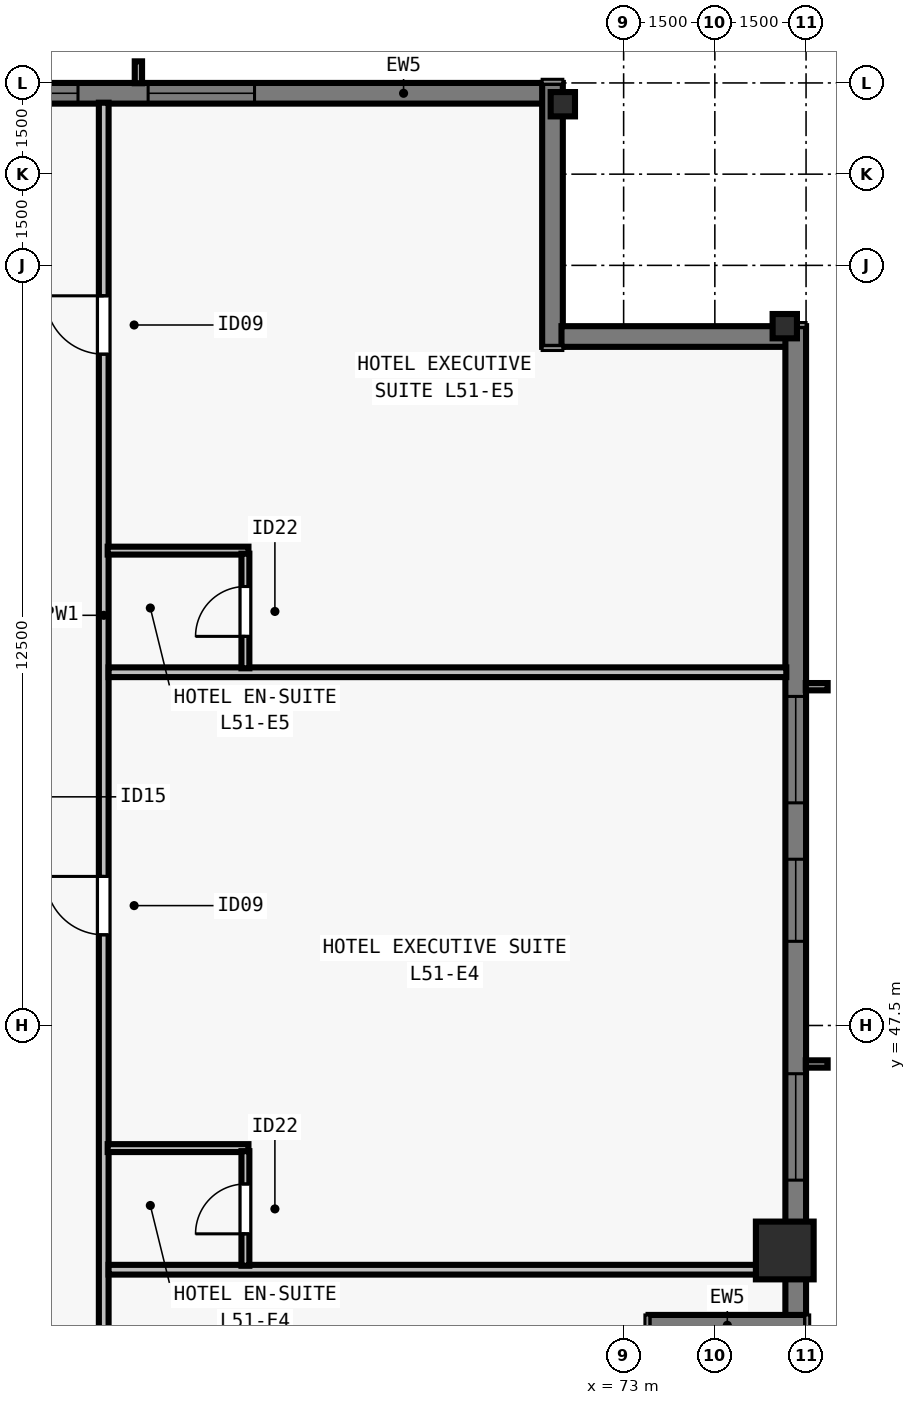
"""IFC4 building model, lengths in metres.
Left out: names, types, materials, properties, quantities, classifications, styles, units other than length and angle.
Written with IfcOpenShell. Run it as: python <this file> out.ifc"""

import sys

from ifc_helpers import new_model, si_unit, direction, frame, frame_2d, origin, origin_2d, place, context, subcontext, project, spatial, rectangle, i_section, extrude, element, fill, save


model = new_model("IFC4")
c1 = context("Model", 3, precision=1e-05, world=origin(), true_north=direction((0.0, 1.0)))
c2 = subcontext(c1, "Body", "Model", "MODEL_VIEW")
j1 = project(units=[si_unit("LENGTHUNIT", "METRE"), si_unit("PLANEANGLEUNIT", "RADIAN")], contexts=[c1])
p1 = place(None, origin())
s1 = spatial("IfcSite", under=j1, at=p1, CompositionType="ELEMENT")
p2 = place(p1, origin())
s2 = spatial("IfcBuilding", under=s1, at=p2, CompositionType="ELEMENT")
p3 = place(p2, frame((0.0, 0.0, 186.5)))
s3 = spatial("IfcBuildingStorey", under=s2, at=p3, CompositionType="ELEMENT", Elevation=186.5)
p4 = place(p3, frame((75.65, 43.8, 0.0), z_axis=(0.0, 0.0, 1.0), x_axis=(0.0, 1.0, 0.0)))
e1 = element("IfcColumn", 1, at=p4, inside=s3, PredefinedType="COLUMN", context=c2, shape_type="SweptSolid", body=[
    extrude(rectangle(XDim=0.95, YDim=0.95, at=origin_2d()), origin(), (0.0, 0.0, 1.0), 3.5),
])
for number, where, z_axis, x_axis in (
    (2, (75.65, 59.0, 0.0), (0.0, 0.0, 1.0), (0.0, 1.0, 0.0)),
    (3, (72.0, 62.65, 0.0), (0.0, 0.0, 1.0), (1.0, 0.0, 0.0)),
):
    element("IfcColumn", number, at=place(p3, frame(where, z_axis=z_axis, x_axis=x_axis)), inside=s3, PredefinedType="COLUMN", context=c2, shape_type="SweptSolid", body=[
        extrude(i_section(OverallWidth=0.4, OverallDepth=0.4, WebThickness=0.022, FlangeThickness=0.036, at=origin_2d()), origin(), (0.0, 0.0, 1.0), 3.5),
    ])
p5 = place(p3, frame((32.0, 62.83, 0.0), z_axis=(0.0, 0.0, 1.0), x_axis=(1.0, 0.0, 0.0)))
e4 = element("IfcWall", 4, at=p5, inside=s3, PredefinedType="SOLIDWALL", context=c2, shape_type="SweptSolid", body=[
    extrude(rectangle(XDim=39.682, YDim=0.34, at=frame_2d((19.841, 0.0))), origin(), (0.0, 0.0, 1.0), 3.28),
])
p6 = place(p5, frame((3.902, 0.0, 0.8)))
e5 = element("IfcOpeningElement", 5, at=p6, cuts=e4, PredefinedType="OPENING", context=c2, shape_type="SweptSolid", body=[
    extrude(rectangle(XDim=1.75, YDim=1.66, at=frame_2d((0.875, 0.83))), frame((0.0, 0.18, 0.0), z_axis=(0.0, -1.0, 0.0), x_axis=(1.0, 0.0, 0.0)), (0.0, 0.0, 1.0), 0.36),
])
p7 = place(p5, frame((8.505, 0.0, 0.8)))
e6 = element("IfcOpeningElement", 6, at=p7, cuts=e4, PredefinedType="OPENING", context=c2, shape_type="SweptSolid", body=[
    extrude(rectangle(XDim=1.35, YDim=1.66, at=frame_2d((0.675, 0.83))), frame((0.0, 0.18, 0.0), z_axis=(0.0, -1.0, 0.0), x_axis=(1.0, 0.0, 0.0)), (0.0, 0.0, 1.0), 0.36),
])
p8 = place(p5, frame((11.859, 0.0, 0.8)))
e7 = element("IfcOpeningElement", 7, at=p8, cuts=e4, PredefinedType="OPENING", context=c2, shape_type="SweptSolid", body=[
    extrude(rectangle(XDim=1.75, YDim=1.66, at=frame_2d((0.875, 0.83))), frame((0.0, 0.18, 0.0), z_axis=(0.0, -1.0, 0.0), x_axis=(1.0, 0.0, 0.0)), (0.0, 0.0, 1.0), 0.36),
])
p9 = place(p5, frame((16.062, 0.0, 0.8)))
e8 = element("IfcOpeningElement", 8, at=p9, cuts=e4, PredefinedType="OPENING", context=c2, shape_type="SweptSolid", body=[
    extrude(rectangle(XDim=1.35, YDim=1.66, at=frame_2d((0.675, 0.83))), frame((0.0, 0.18, 0.0), z_axis=(0.0, -1.0, 0.0), x_axis=(1.0, 0.0, 0.0)), (0.0, 0.0, 1.0), 0.36),
])
p10 = place(p5, frame((17.716, 0.0, 0.8)))
e9 = element("IfcOpeningElement", 9, at=p10, cuts=e4, PredefinedType="OPENING", context=c2, shape_type="SweptSolid", body=[
    extrude(rectangle(XDim=1.75, YDim=1.66, at=frame_2d((0.875, 0.83))), frame((0.0, 0.18, 0.0), z_axis=(0.0, -1.0, 0.0), x_axis=(1.0, 0.0, 0.0)), (0.0, 0.0, 1.0), 0.36),
])
p11 = place(p5, frame((22.719, 0.0, 0.8)))
e10 = element("IfcOpeningElement", 10, at=p11, cuts=e4, PredefinedType="OPENING", context=c2, shape_type="SweptSolid", body=[
    extrude(rectangle(XDim=1.35, YDim=1.66, at=frame_2d((0.675, 0.83))), frame((0.0, 0.18, 0.0), z_axis=(0.0, -1.0, 0.0), x_axis=(1.0, 0.0, 0.0)), (0.0, 0.0, 1.0), 0.36),
])
p12 = place(p5, frame((26.073, 0.0, 0.8)))
e11 = element("IfcOpeningElement", 11, at=p12, cuts=e4, PredefinedType="OPENING", context=c2, shape_type="SweptSolid", body=[
    extrude(rectangle(XDim=1.75, YDim=1.66, at=frame_2d((0.875, 0.83))), frame((0.0, 0.18, 0.0), z_axis=(0.0, -1.0, 0.0), x_axis=(1.0, 0.0, 0.0)), (0.0, 0.0, 1.0), 0.36),
])
p13 = place(p5, frame((30.677, 0.0, 0.8)))
e12 = element("IfcOpeningElement", 12, at=p13, cuts=e4, PredefinedType="OPENING", context=c2, shape_type="SweptSolid", body=[
    extrude(rectangle(XDim=1.35, YDim=1.66, at=frame_2d((0.675, 0.83))), frame((0.0, 0.18, 0.0), z_axis=(0.0, -1.0, 0.0), x_axis=(1.0, 0.0, 0.0)), (0.0, 0.0, 1.0), 0.36),
])
p14 = place(p5, frame((33.18, 0.0, 0.8)))
e13 = element("IfcOpeningElement", 13, at=p14, cuts=e4, PredefinedType="OPENING", context=c2, shape_type="SweptSolid", body=[
    extrude(rectangle(XDim=1.75, YDim=1.66, at=frame_2d((0.875, 0.83))), frame((0.0, 0.18, 0.0), z_axis=(0.0, -1.0, 0.0), x_axis=(1.0, 0.0, 0.0)), (0.0, 0.0, 1.0), 0.36),
])
p15 = place(p3, frame((71.83, 63.0, 0.0), z_axis=(0.0, 0.0, 1.0), x_axis=(0.0, -1.0, 0.0)))
e14 = element("IfcWall", 14, at=p15, inside=s3, PredefinedType="SOLIDWALL", context=c2, shape_type="SweptSolid", body=[
    extrude(rectangle(XDim=4.34, YDim=0.34, at=frame_2d((2.17, 0.0))), origin(), (0.0, 0.0, 1.0), 3.28),
])
p16 = place(p3, frame((71.978, 58.83, 0.0), z_axis=(0.0, 0.0, 1.0), x_axis=(1.0, 0.0, 0.0)))
e15 = element("IfcWall", 15, at=p16, inside=s3, PredefinedType="SOLIDWALL", context=c2, shape_type="SweptSolid", body=[
    extrude(rectangle(XDim=3.704, YDim=0.34, at=frame_2d((1.852, 0.0))), origin(), (0.0, 0.0, 1.0), 3.28),
])
p17 = place(p3, frame((75.83, 59.0, 0.0), z_axis=(0.0, 0.0, 1.0), x_axis=(0.0, -1.0, 0.0)))
e16 = element("IfcWall", 16, at=p17, inside=s3, PredefinedType="SOLIDWALL", context=c2, shape_type="SweptSolid", body=[
    extrude(rectangle(XDim=16.282, YDim=0.34, at=frame_2d((8.141, 0.0))), origin(), (0.0, 0.0, 1.0), 3.28),
])
p18 = place(p17, frame((6.089, 0.0, 0.8)))
e17 = element("IfcOpeningElement", 17, at=p18, cuts=e16, PredefinedType="OPENING", context=c2, shape_type="SweptSolid", body=[
    extrude(rectangle(XDim=1.75, YDim=1.66, at=frame_2d((0.875, 0.83))), frame((0.0, 0.18, 0.0), z_axis=(0.0, -1.0, 0.0), x_axis=(1.0, 0.0, 0.0)), (0.0, 0.0, 1.0), 0.36),
])
p19 = place(p17, frame((8.766, 0.0, 0.8)))
e18 = element("IfcOpeningElement", 18, at=p19, cuts=e16, PredefinedType="OPENING", context=c2, shape_type="SweptSolid", body=[
    extrude(rectangle(XDim=1.35, YDim=1.66, at=frame_2d((0.675, 0.83))), frame((0.0, 0.18, 0.0), z_axis=(0.0, -1.0, 0.0), x_axis=(1.0, 0.0, 0.0)), (0.0, 0.0, 1.0), 0.36),
])
p20 = place(p17, frame((12.293, 0.0, 0.8)))
e19 = element("IfcOpeningElement", 19, at=p20, cuts=e16, PredefinedType="OPENING", context=c2, shape_type="SweptSolid", body=[
    extrude(rectangle(XDim=1.75, YDim=1.66, at=frame_2d((0.875, 0.83))), frame((0.0, 0.18, 0.0), z_axis=(0.0, -1.0, 0.0), x_axis=(1.0, 0.0, 0.0)), (0.0, 0.0, 1.0), 0.36),
])
p21 = place(p3, frame((76.0, 42.57, 0.0), z_axis=(0.0, 0.0, 1.0), x_axis=(-1.0, 0.0, 0.0)))
e20 = element("IfcWall", 20, at=p21, inside=s3, PredefinedType="SOLIDWALL", context=c2, shape_type="SweptSolid", body=[
    extrude(rectangle(XDim=2.59, YDim=0.34, at=frame_2d((1.295, 0.0))), origin(), (0.0, 0.0, 1.0), 3.28),
])
p22 = place(p3, frame((64.45, 15.325, 0.0), z_axis=(0.0, 0.0, 1.0), x_axis=(0.0, 1.0, 0.0)))
e21 = element("IfcWall", 21, at=p22, inside=s3, PredefinedType="PARTITIONING", context=c2, shape_type="SweptSolid", body=[
    extrude(rectangle(XDim=47.35, YDim=0.16, at=frame_2d((23.675, 0.0))), origin(), (0.0, 0.0, 1.0), 2.555),
])
p23 = place(p22, frame((5.515, 0.0, 0.0)))
e22 = element("IfcOpeningElement", 22, at=p23, cuts=e21, PredefinedType="OPENING", context=c2, shape_type="SweptSolid", body=[
    extrude(rectangle(XDim=0.96, YDim=2.15, at=frame_2d((0.48, 1.075))), frame((0.0, 0.09, 0.0), z_axis=(0.0, -1.0, 0.0), x_axis=(1.0, 0.0, 0.0)), (0.0, 0.0, 1.0), 0.18),
])
p24 = place(p22, frame((14.802, 0.0, 0.0)))
e23 = element("IfcOpeningElement", 23, at=p24, cuts=e21, PredefinedType="OPENING", context=c2, shape_type="SweptSolid", body=[
    extrude(rectangle(XDim=0.96, YDim=2.15, at=frame_2d((0.48, 1.075))), frame((0.0, 0.09, 0.0), z_axis=(0.0, -1.0, 0.0), x_axis=(1.0, 0.0, 0.0)), (0.0, 0.0, 1.0), 0.18),
])
p25 = place(p22, frame((24.234, 0.0, 0.0)))
e24 = element("IfcOpeningElement", 24, at=p25, cuts=e21, PredefinedType="OPENING", context=c2, shape_type="SweptSolid", body=[
    extrude(rectangle(XDim=0.96, YDim=2.15, at=frame_2d((0.48, 1.075))), frame((0.0, 0.09, 0.0), z_axis=(0.0, -1.0, 0.0), x_axis=(1.0, 0.0, 0.0)), (0.0, 0.0, 1.0), 0.18),
])
p26 = place(p22, frame((33.666, 0.0, 0.0)))
e25 = element("IfcOpeningElement", 25, at=p26, cuts=e21, PredefinedType="OPENING", context=c2, shape_type="SweptSolid", body=[
    extrude(rectangle(XDim=0.96, YDim=2.15, at=frame_2d((0.48, 1.075))), frame((0.0, 0.09, 0.0), z_axis=(0.0, -1.0, 0.0), x_axis=(1.0, 0.0, 0.0)), (0.0, 0.0, 1.0), 0.18),
])
p27 = place(p22, frame((43.214, 0.0, 0.0)))
e26 = element("IfcOpeningElement", 26, at=p27, cuts=e21, PredefinedType="OPENING", context=c2, shape_type="SweptSolid", body=[
    extrude(rectangle(XDim=0.96, YDim=2.15, at=frame_2d((0.48, 1.075))), frame((0.0, 0.09, 0.0), z_axis=(0.0, -1.0, 0.0), x_axis=(1.0, 0.0, 0.0)), (0.0, 0.0, 1.0), 0.18),
])
p28 = place(p3, frame((64.53, 43.484, 0.0), z_axis=(0.0, 0.0, 1.0), x_axis=(1.0, 0.0, 0.0)))
e27 = element("IfcWall", 27, at=p28, inside=s3, PredefinedType="PARTITIONING", context=c2, shape_type="SweptSolid", body=[
    extrude(rectangle(XDim=11.145, YDim=0.16, at=frame_2d((5.573, 0.0))), origin(), (0.0, 0.0, 1.0), 3.28),
])
p29 = place(p3, frame((64.515, 45.484, 0.0), z_axis=(0.0, 0.0, 1.0), x_axis=(1.0, 0.0, 0.0)))
e28 = element("IfcWall", 28, at=p29, inside=s3, PredefinedType="PLUMBINGWALL", context=c2, shape_type="SweptSolid", body=[
    extrude(rectangle(XDim=2.315, YDim=0.13, at=frame_2d((1.158, 0.0))), origin(), (0.0, 0.0, 1.0), 3.28),
])
p30 = place(p3, frame((66.78, 43.549, 0.0), z_axis=(0.0, 0.0, 1.0), x_axis=(0.0, 1.0, 0.0)))
e29 = element("IfcWall", 29, at=p30, inside=s3, PredefinedType="PLUMBINGWALL", context=c2, shape_type="SweptSolid", body=[
    extrude(rectangle(XDim=1.885, YDim=0.13, at=frame_2d((0.942, 0.0))), origin(), (0.0, 0.0, 1.0), 3.28),
])
p31 = place(p30, frame((0.525, 0.0, 0.0)))
e30 = element("IfcOpeningElement", 30, at=p31, cuts=e29, PredefinedType="OPENING", context=c2, shape_type="SweptSolid", body=[
    extrude(rectangle(XDim=0.82, YDim=2.1, at=frame_2d((0.41, 1.05))), frame((0.0, 0.075, 0.0), z_axis=(0.0, -1.0, 0.0), x_axis=(1.0, 0.0, 0.0)), (0.0, 0.0, 1.0), 0.15),
])
p32 = place(p3, frame((64.53, 53.309, 0.0), z_axis=(0.0, 0.0, 1.0), x_axis=(1.0, 0.0, 0.0)))
e31 = element("IfcWall", 31, at=p32, inside=s3, PredefinedType="PARTITIONING", context=c2, shape_type="SweptSolid", body=[
    extrude(rectangle(XDim=11.145, YDim=0.16, at=frame_2d((5.573, 0.0))), origin(), (0.0, 0.0, 1.0), 2.896),
])
p33 = place(p3, frame((64.515, 55.309, 0.0), z_axis=(0.0, 0.0, 1.0), x_axis=(1.0, 0.0, 0.0)))
e32 = element("IfcWall", 32, at=p33, inside=s3, PredefinedType="PLUMBINGWALL", context=c2, shape_type="SweptSolid", body=[
    extrude(rectangle(XDim=2.315, YDim=0.13, at=frame_2d((1.158, 0.0))), origin(), (0.0, 0.0, 1.0), 3.28),
])
p34 = place(p3, frame((66.78, 53.374, 0.0), z_axis=(0.0, 0.0, 1.0), x_axis=(0.0, 1.0, 0.0)))
e33 = element("IfcWall", 33, at=p34, inside=s3, PredefinedType="PLUMBINGWALL", context=c2, shape_type="SweptSolid", body=[
    extrude(rectangle(XDim=1.885, YDim=0.13, at=frame_2d((0.942, 0.0))), origin(), (0.0, 0.0, 1.0), 3.28),
])
p35 = place(p34, frame((0.525, 0.0, 0.0)))
e34 = element("IfcOpeningElement", 34, at=p35, cuts=e33, PredefinedType="OPENING", context=c2, shape_type="SweptSolid", body=[
    extrude(rectangle(XDim=0.82, YDim=2.1, at=frame_2d((0.41, 1.05))), frame((0.0, 0.075, 0.0), z_axis=(0.0, -1.0, 0.0), x_axis=(1.0, 0.0, 0.0)), (0.0, 0.0, 1.0), 0.15),
])
p36 = place(p13, origin())
e35 = element("IfcWindow", 35, at=p36, inside=s3, PartitioningType="SINGLE_PANEL", PredefinedType="WINDOW", context=c2, shape_type="SweptSolid", body=[
    extrude(rectangle(XDim=1.35, YDim=1.66, at=frame_2d((0.675, 0.83))), frame((0.0, -0.05, 0.0), z_axis=(0.0, -1.0, 0.0), x_axis=(1.0, 0.0, 0.0)), (0.0, 0.0, 1.0), 0.06),
])
fill(e12, e35)
p37 = place(p14, origin())
e36 = element("IfcWindow", 36, at=p37, inside=s3, PartitioningType="SINGLE_PANEL", PredefinedType="WINDOW", context=c2, shape_type="SweptSolid", body=[
    extrude(rectangle(XDim=1.75, YDim=1.66, at=frame_2d((0.875, 0.83))), frame((0.0, -0.05, 0.0), z_axis=(0.0, -1.0, 0.0), x_axis=(1.0, 0.0, 0.0)), (0.0, 0.0, 1.0), 0.06),
])
fill(e13, e36)
p38 = place(p18, origin())
e37 = element("IfcWindow", 37, at=p38, inside=s3, PartitioningType="SINGLE_PANEL", PredefinedType="WINDOW", context=c2, shape_type="SweptSolid", body=[
    extrude(rectangle(XDim=1.75, YDim=1.66, at=frame_2d((0.875, 0.83))), frame((0.0, -0.05, 0.0), z_axis=(0.0, -1.0, 0.0), x_axis=(1.0, 0.0, 0.0)), (0.0, 0.0, 1.0), 0.06),
])
fill(e17, e37)
p39 = place(p19, origin())
e38 = element("IfcWindow", 38, at=p39, inside=s3, PartitioningType="SINGLE_PANEL", PredefinedType="WINDOW", context=c2, shape_type="SweptSolid", body=[
    extrude(rectangle(XDim=1.35, YDim=1.66, at=frame_2d((0.675, 0.83))), frame((0.0, -0.05, 0.0), z_axis=(0.0, -1.0, 0.0), x_axis=(1.0, 0.0, 0.0)), (0.0, 0.0, 1.0), 0.06),
])
fill(e18, e38)
p40 = place(p20, origin())
e39 = element("IfcWindow", 39, at=p40, inside=s3, PartitioningType="SINGLE_PANEL", PredefinedType="WINDOW", context=c2, shape_type="SweptSolid", body=[
    extrude(rectangle(XDim=1.75, YDim=1.66, at=frame_2d((0.875, 0.83))), frame((0.0, -0.05, 0.0), z_axis=(0.0, -1.0, 0.0), x_axis=(1.0, 0.0, 0.0)), (0.0, 0.0, 1.0), 0.06),
])
fill(e19, e39)
p41 = place(p31, origin())
e40 = element("IfcDoor", 40, at=p41, inside=s3, OperationType="SINGLE_SWING_LEFT", PredefinedType="DOOR", context=c2, shape_type="SweptSolid", body=[
    extrude(rectangle(XDim=0.82, YDim=2.1, at=frame_2d((0.41, 1.05))), frame((0.0, 0.025, 0.0), z_axis=(0.0, -1.0, 0.0), x_axis=(1.0, 0.0, 0.0)), (0.0, 0.0, 1.0), 0.05),
])
fill(e30, e40)
p42 = place(p26, origin())
e41 = element("IfcDoor", 41, at=p42, inside=s3, OperationType="SINGLE_SWING_RIGHT", PredefinedType="DOOR", context=c2, shape_type="SweptSolid", body=[
    extrude(rectangle(XDim=0.96, YDim=2.15, at=frame_2d((0.48, 1.075))), frame((0.0, 0.025, 0.0), z_axis=(0.0, -1.0, 0.0), x_axis=(1.0, 0.0, 0.0)), (0.0, 0.0, 1.0), 0.05),
])
fill(e25, e41)
p43 = place(p35, origin())
e42 = element("IfcDoor", 42, at=p43, inside=s3, OperationType="SINGLE_SWING_LEFT", PredefinedType="DOOR", context=c2, shape_type="SweptSolid", body=[
    extrude(rectangle(XDim=0.82, YDim=2.1, at=frame_2d((0.41, 1.05))), frame((0.0, 0.025, 0.0), z_axis=(0.0, -1.0, 0.0), x_axis=(1.0, 0.0, 0.0)), (0.0, 0.0, 1.0), 0.05),
])
fill(e34, e42)
p44 = place(p27, origin())
e43 = element("IfcDoor", 43, at=p44, inside=s3, OperationType="SINGLE_SWING_RIGHT", PredefinedType="DOOR", context=c2, shape_type="SweptSolid", body=[
    extrude(rectangle(XDim=0.96, YDim=2.15, at=frame_2d((0.48, 1.075))), frame((0.0, 0.025, 0.0), z_axis=(0.0, -1.0, 0.0), x_axis=(1.0, 0.0, 0.0)), (0.0, 0.0, 1.0), 0.05),
])
fill(e26, e43)
save(model, sys.argv[1])
